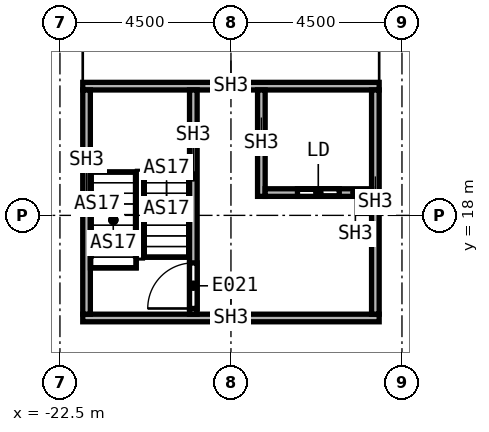
"""IFC4 building model, lengths in metres.
Left out: names, types, materials, properties, quantities, classifications, styles, units other than length and angle.
Written with IfcOpenShell. Run it as: python <this file> out.ifc"""

import sys

from ifc_helpers import new_model, si_unit, direction, frame, frame_2d, origin, place, context, subcontext, project, spatial, rectangle, extrude, element, fill, save


model = new_model("IFC4")
c1 = context("Model", 3, precision=1e-05, world=origin(), true_north=direction((0.0, 1.0)))
c2 = subcontext(c1, "Body", "Model", "MODEL_VIEW")
j1 = project(units=[si_unit("LENGTHUNIT", "METRE"), si_unit("PLANEANGLEUNIT", "RADIAN")], contexts=[c1])
p1 = place(None, origin())
s1 = spatial("IfcSite", under=j1, at=p1, CompositionType="ELEMENT")
p2 = place(p1, origin())
s2 = spatial("IfcBuilding", under=s1, at=p2, CompositionType="ELEMENT")
p3 = place(p2, frame((0.0, 0.0, 19.0)))
s3 = spatial("IfcBuildingStorey", under=s2, at=p3, CompositionType="ELEMENT", Elevation=19.0)
for number, where, z_axis, x_axis in (
    (1, (-21.9, 15.3, 0.0), (0.0, 0.0, 1.0), (1.0, 0.0, 0.0)),
    (2, (-21.9, 21.4, 0.0), (0.0, 0.0, 1.0), (1.0, 0.0, 0.0)),
):
    element("IfcWall", number, at=place(p3, frame(where, z_axis=z_axis, x_axis=x_axis)), inside=s3, PredefinedType="SOLIDWALL", context=c2, shape_type="SweptSolid", body=[
        extrude(rectangle(XDim=7.8, YDim=0.2, at=frame_2d((3.9, 0.0))), origin(), (0.0, 0.0, 1.0), 5.7),
    ])
for number, where, z_axis, x_axis in (
    (3, (-21.8, 15.4, 0.0), (0.0, 0.0, 1.0), (0.0, 1.0, 0.0)),
    (4, (-14.2, 15.4, 0.0), (0.0, 0.0, 1.0), (0.0, 1.0, 0.0)),
):
    element("IfcWall", number, at=place(p3, frame(where, z_axis=z_axis, x_axis=x_axis)), inside=s3, PredefinedType="SOLIDWALL", context=c2, shape_type="SweptSolid", body=[
        extrude(rectangle(XDim=5.9, YDim=0.2, at=frame_2d((2.95, 0.0))), origin(), (0.0, 0.0, 1.0), 5.7),
    ])
p4 = place(p3, frame((-18.99, 15.4, 0.0), z_axis=(0.0, 0.0, 1.0), x_axis=(0.0, 1.0, 0.0)))
e5 = element("IfcWall", 5, at=p4, inside=s3, PredefinedType="SOLIDWALL", context=c2, shape_type="SweptSolid", body=[
    extrude(rectangle(XDim=5.9, YDim=0.2, at=frame_2d((2.95, 0.0))), origin(), (0.0, 0.0, 1.0), 5.7),
])
p5 = place(p4, frame((0.15, 0.0, 0.0)))
e6 = element("IfcOpeningElement", 6, at=p5, cuts=e5, PredefinedType="OPENING", context=c2, shape_type="SweptSolid", body=[
    extrude(rectangle(XDim=1.2, YDim=2.1, at=frame_2d((0.6, 1.05))), frame((0.0, 0.1, 0.0), z_axis=(0.0, -1.0, 0.0), x_axis=(1.0, 0.0, 0.0)), (0.0, 0.0, 1.0), 0.2),
])
p6 = place(p3, frame((-17.2, 18.5, 0.0), z_axis=(0.0, 0.0, 1.0), x_axis=(0.0, 1.0, 0.0)))
e7 = element("IfcWall", 7, at=p6, inside=s3, PredefinedType="SOLIDWALL", context=c2, shape_type="SweptSolid", body=[
    extrude(rectangle(XDim=2.8, YDim=0.2, at=frame_2d((1.4, 0.0))), origin(), (0.0, 0.0, 1.0), 5.7),
])
p7 = place(p3, frame((-17.1, 18.6, 0.0), z_axis=(0.0, 0.0, 1.0), x_axis=(1.0, 0.0, 0.0)))
e8 = element("IfcWall", 8, at=p7, inside=s3, PredefinedType="SOLIDWALL", context=c2, shape_type="SweptSolid", body=[
    extrude(rectangle(XDim=2.8, YDim=0.2, at=frame_2d((1.4, 0.0))), origin(), (0.0, 0.0, 1.0), 5.7),
])
p8 = place(p7, frame((0.85, 0.0, 0.0)))
e9 = element("IfcOpeningElement", 9, at=p8, cuts=e8, PredefinedType="OPENING", context=c2, shape_type="SweptSolid", body=[
    extrude(rectangle(XDim=1.1, YDim=2.1, at=frame_2d((0.55, 1.05))), frame((0.0, 0.1, 0.0), z_axis=(0.0, -1.0, 0.0), x_axis=(1.0, 0.0, 0.0)), (0.0, 0.0, 1.0), 0.2),
])
p9 = place(p5, origin())
e10 = element("IfcDoor", 10, at=p9, inside=s3, OperationType="SINGLE_SWING_LEFT", PredefinedType="DOOR", context=c2, shape_type="SweptSolid", body=[
    extrude(rectangle(XDim=1.2, YDim=2.1, at=frame_2d((0.6, 1.05))), frame((0.0, 0.025, 0.0), z_axis=(0.0, -1.0, 0.0), x_axis=(1.0, 0.0, 0.0)), (0.0, 0.0, 1.0), 0.05),
])
fill(e6, e10)
p10 = place(p8, origin())
e11 = element("IfcDoor", 11, at=p10, inside=s3, OperationType="SLIDING_TO_LEFT", PredefinedType="DOOR", context=c2, shape_type="SweptSolid", body=[
    extrude(rectangle(XDim=1.1, YDim=2.1, at=frame_2d((0.55, 1.05))), frame((0.0, 0.025, 0.0), z_axis=(0.0, -1.0, 0.0), x_axis=(1.0, 0.0, 0.0)), (0.0, 0.0, 1.0), 0.05),
])
fill(e9, e11)
save(model, sys.argv[1])
